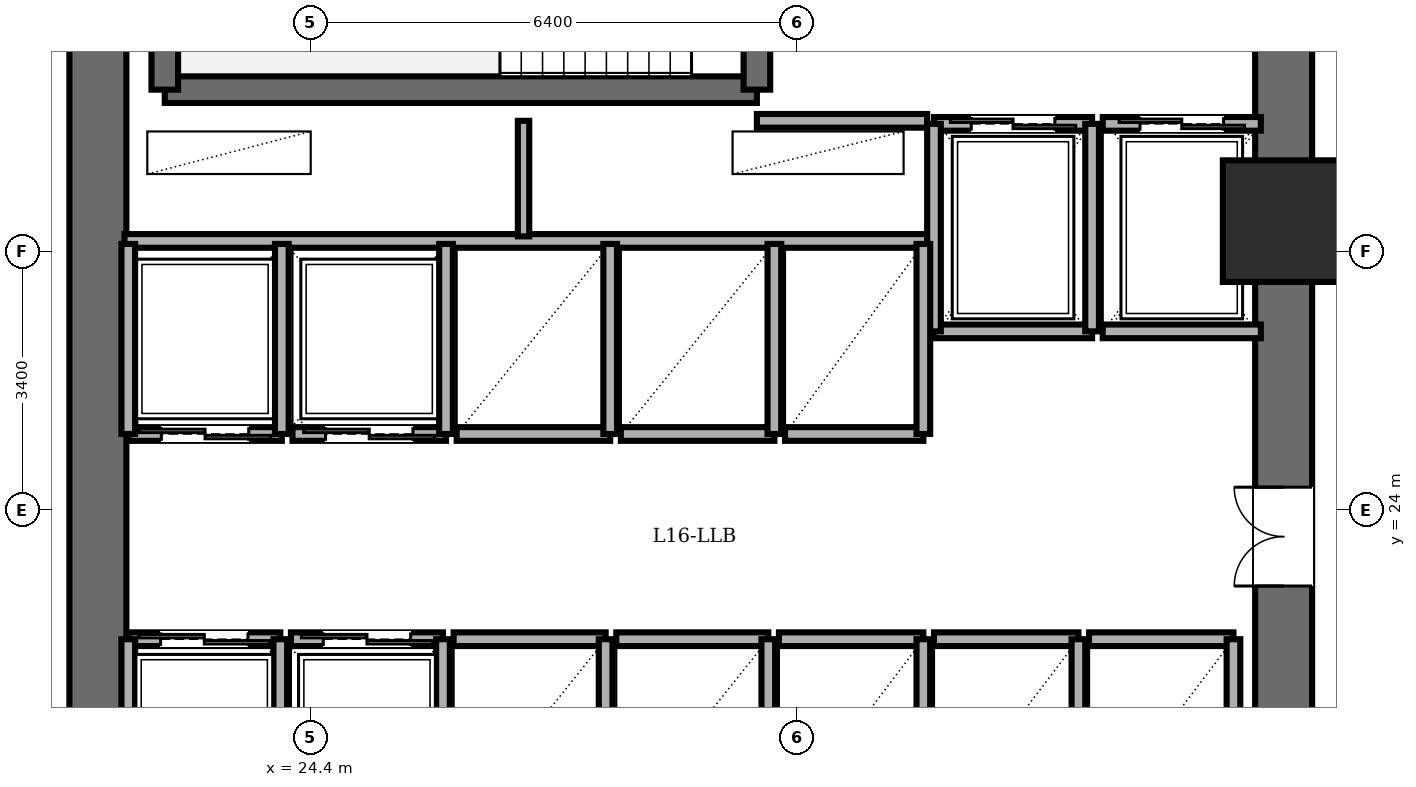
"""IFC4 building model, lengths in metres.
Left out: names, types, materials, properties, quantities, classifications, styles, units other than length and angle.
Written with IfcOpenShell. Run it as: python <this file> out.ifc"""

import sys

from ifc_helpers import new_model, si_unit, direction, frame, frame_2d, origin, origin_2d, place, context, subcontext, project, spatial, rectangle, extrude, element, fill, save


model = new_model("IFC4")
c1 = context("Model", 3, precision=1e-05, world=origin(), true_north=direction((0.0, 1.0)))
c2 = subcontext(c1, "Body", "Model", "MODEL_VIEW")
j1 = project(units=[si_unit("LENGTHUNIT", "METRE"), si_unit("PLANEANGLEUNIT", "RADIAN")], contexts=[c1])
p1 = place(None, origin())
s1 = spatial("IfcSite", under=j1, at=p1, CompositionType="ELEMENT")
p2 = place(p1, origin())
s2 = spatial("IfcBuilding", under=s1, at=p2, CompositionType="ELEMENT")
p3 = place(p2, frame((0.0, 0.0, 61.2)))
s3 = spatial("IfcBuildingStorey", under=s2, at=p3, CompositionType="ELEMENT", Elevation=61.2)
p4 = place(p3, frame((37.2, 27.8, 0.0), z_axis=(0.0, 0.0, 1.0), x_axis=(1.0, 0.0, 0.0)))
e1 = element("IfcColumn", 1, at=p4, inside=s3, PredefinedType="COLUMN", context=c2, shape_type="SweptSolid", body=[
    extrude(rectangle(XDim=1.6, YDim=1.6, at=origin_2d()), origin(), (0.0, 0.0, 1.0), 3.6),
])
p5 = place(p3, frame((21.6, 14.4, 0.0), z_axis=(0.0, 0.0, 1.0), x_axis=(0.0, 1.0, 0.0)))
e2 = element("IfcWall", 2, at=p5, inside=s3, PredefinedType="SHEAR", context=c2, shape_type="SweptSolid", body=[
    extrude(rectangle(XDim=19.2, YDim=0.75, at=frame_2d((9.6, 0.0))), origin(), (0.0, 0.0, 1.0), 3.4),
])
p6 = place(p3, frame((37.2, 14.4, 0.0), z_axis=(0.0, 0.0, 1.0), x_axis=(0.0, 1.0, 0.0)))
e3 = element("IfcWall", 3, at=p6, inside=s3, PredefinedType="SHEAR", context=c2, shape_type="SweptSolid", body=[
    extrude(rectangle(XDim=19.2, YDim=0.75, at=frame_2d((9.6, 0.0))), origin(), (0.0, 0.0, 1.0), 3.4),
])
p7 = place(p6, frame((15.8, 0.0, 0.0)))
e4 = element("IfcOpeningElement", 4, at=p7, cuts=e3, PredefinedType="OPENING", context=c2, shape_type="SweptSolid", body=[
    extrude(rectangle(XDim=1.15, YDim=2.15, at=frame_2d((0.575, 1.075))), frame((0.0, 0.385, 0.0), z_axis=(0.0, -1.0, 0.0), x_axis=(1.0, 0.0, 0.0)), (0.0, 0.0, 1.0), 0.77),
])
p8 = place(p6, frame((3.6, 0.0, 0.0)))
e5 = element("IfcOpeningElement", 5, at=p8, cuts=e3, PredefinedType="OPENING", context=c2, shape_type="SweptSolid", body=[
    extrude(rectangle(XDim=1.1, YDim=2.15, at=frame_2d((0.55, 1.075))), frame((0.0, 0.385, 0.0), z_axis=(0.0, -1.0, 0.0), x_axis=(1.0, 0.0, 0.0)), (0.0, 0.0, 1.0), 0.77),
])
p9 = place(p6, frame((8.6, 0.0, 0.0)))
e6 = element("IfcOpeningElement", 6, at=p9, cuts=e3, PredefinedType="OPENING", context=c2, shape_type="SweptSolid", body=[
    extrude(rectangle(XDim=1.3, YDim=2.2, at=frame_2d((0.65, 1.1))), frame((0.0, 0.385, 0.0), z_axis=(0.0, -1.0, 0.0), x_axis=(1.0, 0.0, 0.0)), (0.0, 0.0, 1.0), 0.77),
])
p10 = place(p3, frame((22.48, 29.53, 0.0), z_axis=(0.0, 0.0, 1.0), x_axis=(1.0, 0.0, 0.0)))
e7 = element("IfcWall", 7, at=p10, inside=s3, PredefinedType="SOLIDWALL", context=c2, shape_type="SweptSolid", body=[
    extrude(rectangle(XDim=7.79, YDim=0.35, at=frame_2d((3.895, 0.0))), origin(), (0.0, 0.0, 1.0), 3.4),
])
p11 = place(p3, frame((22.48, 29.53, 0.0), z_axis=(0.0, 0.0, 1.0), x_axis=(0.0, 1.0, 0.0)))
e8 = element("IfcWall", 8, at=p11, inside=s3, PredefinedType="SOLIDWALL", context=c2, shape_type="SweptSolid", body=[
    extrude(rectangle(XDim=3.58, YDim=0.35, at=frame_2d((1.79, 0.0))), origin(), (0.0, 0.0, 1.0), 3.4),
])
p12 = place(p3, frame((30.27, 29.53, 0.0), z_axis=(0.0, 0.0, 1.0), x_axis=(0.0, 1.0, 0.0)))
e9 = element("IfcWall", 9, at=p12, inside=s3, PredefinedType="SOLIDWALL", context=c2, shape_type="SweptSolid", body=[
    extrude(rectangle(XDim=3.58, YDim=0.35, at=frame_2d((1.79, 0.0))), origin(), (0.0, 0.0, 1.0), 3.4),
])
p13 = place(p12, frame((1.25, 0.0, 0.0)))
e10 = element("IfcOpeningElement", 10, at=p13, cuts=e9, PredefinedType="OPENING", context=c2, shape_type="SweptSolid", body=[
    extrude(rectangle(XDim=1.1, YDim=2.15, at=frame_2d((0.55, 1.075))), frame((0.0, 0.185, 0.0), z_axis=(0.0, -1.0, 0.0), x_axis=(1.0, 0.0, 0.0)), (0.0, 0.0, 1.0), 0.37),
])
p14 = place(p3, frame((30.27, 29.12, 0.0), z_axis=(0.0, 0.0, 1.0), x_axis=(1.0, 0.0, 0.0)))
e11 = element("IfcWall", 11, at=p14, inside=s3, PredefinedType="PARTITIONING", context=c2, shape_type="SweptSolid", body=[
    extrude(rectangle(XDim=2.24, YDim=0.18, at=frame_2d((1.12, 0.0))), origin(), (0.0, 0.0, 1.0), 3.4),
])
p15 = place(p3, frame((21.95, 27.54, 0.0), z_axis=(0.0, 0.0, 1.0), x_axis=(1.0, 0.0, 0.0)))
e12 = element("IfcWall", 12, at=p15, inside=s3, PredefinedType="PARTITIONING", context=c2, shape_type="SweptSolid", body=[
    extrude(rectangle(XDim=10.56, YDim=0.18, at=frame_2d((5.28, 0.0))), origin(), (0.0, 0.0, 1.0), 3.4),
])
p16 = place(p3, frame((27.2, 27.6, 0.0), z_axis=(0.0, 0.0, 1.0), x_axis=(0.0, 1.0, 0.0)))
e13 = element("IfcWall", 13, at=p16, inside=s3, PredefinedType="PARTITIONING", context=c2, shape_type="SweptSolid", body=[
    extrude(rectangle(XDim=1.52, YDim=0.15, at=frame_2d((0.76, 0.0))), origin(), (0.0, 0.0, 1.0), 3.4),
])
p17 = place(p3, frame((32.6, 29.08, 0.0), z_axis=(0.0, 0.0, 1.0), x_axis=(1.0, 0.0, 0.0)))
e14 = element("IfcWall", 14, at=p17, inside=s3, PredefinedType="PARTITIONING", context=c2, shape_type="SweptSolid", body=[
    extrude(rectangle(XDim=2.08, YDim=0.18, at=frame_2d((1.04, 0.0))), origin(), (0.0, 0.0, 1.0), 3.4),
])
p18 = place(p17, frame((0.49, 0.0, 0.0)))
e15 = element("IfcOpeningElement", 15, at=p18, cuts=e14, PredefinedType="OPENING", context=c2, shape_type="SweptSolid", body=[
    extrude(rectangle(XDim=1.1, YDim=2.2, at=frame_2d((0.55, 1.1))), frame((0.0, 0.1, 0.0), z_axis=(0.0, -1.0, 0.0), x_axis=(1.0, 0.0, 0.0)), (0.0, 0.0, 1.0), 0.2),
])
p19 = place(p3, frame((34.68, 26.35, 0.0), z_axis=(0.0, 0.0, 1.0), x_axis=(-1.0, 0.0, 0.0)))
e16 = element("IfcWall", 16, at=p19, inside=s3, PredefinedType="PARTITIONING", context=c2, shape_type="SweptSolid", body=[
    extrude(rectangle(XDim=2.08, YDim=0.18, at=frame_2d((1.04, 0.0))), origin(), (0.0, 0.0, 1.0), 3.4),
])
for number, where, z_axis, x_axis in (
    (17, (34.68, 26.35, 0.0), (0.0, 0.0, 1.0), (0.0, 1.0, 0.0)),
    (18, (32.6, 29.08, 0.0), (0.0, 0.0, 1.0), (0.0, -1.0, 0.0)),
):
    element("IfcWall", number, at=place(p3, frame(where, z_axis=z_axis, x_axis=x_axis)), inside=s3, PredefinedType="PARTITIONING", context=c2, shape_type="SweptSolid", body=[
        extrude(rectangle(XDim=2.73, YDim=0.18, at=frame_2d((1.365, 0.0))), origin(), (0.0, 0.0, 1.0), 3.4),
    ])
p20 = place(p3, frame((34.82, 29.08, 0.0), z_axis=(0.0, 0.0, 1.0), x_axis=(1.0, 0.0, 0.0)))
e19 = element("IfcWall", 19, at=p20, inside=s3, PredefinedType="PARTITIONING", context=c2, shape_type="SweptSolid", body=[
    extrude(rectangle(XDim=2.08, YDim=0.18, at=frame_2d((1.04, 0.0))), origin(), (0.0, 0.0, 1.0), 3.4),
])
p21 = place(p20, frame((0.49, 0.0, 0.0)))
e20 = element("IfcOpeningElement", 20, at=p21, cuts=e19, PredefinedType="OPENING", context=c2, shape_type="SweptSolid", body=[
    extrude(rectangle(XDim=1.1, YDim=2.2, at=frame_2d((0.55, 1.1))), frame((0.0, 0.1, 0.0), z_axis=(0.0, -1.0, 0.0), x_axis=(1.0, 0.0, 0.0)), (0.0, 0.0, 1.0), 0.2),
])
p22 = place(p3, frame((36.9, 26.35, 0.0), z_axis=(0.0, 0.0, 1.0), x_axis=(-1.0, 0.0, 0.0)))
e21 = element("IfcWall", 21, at=p22, inside=s3, PredefinedType="PARTITIONING", context=c2, shape_type="SweptSolid", body=[
    extrude(rectangle(XDim=2.08, YDim=0.18, at=frame_2d((1.04, 0.0))), origin(), (0.0, 0.0, 1.0), 3.4),
])
p23 = place(p3, frame((24.02, 25.0, 0.0), z_axis=(0.0, 0.0, 1.0), x_axis=(-1.0, 0.0, 0.0)))
e22 = element("IfcWall", 22, at=p23, inside=s3, PredefinedType="PARTITIONING", context=c2, shape_type="SweptSolid", body=[
    extrude(rectangle(XDim=2.02, YDim=0.18, at=frame_2d((1.01, 0.0))), origin(), (0.0, 0.0, 1.0), 3.4),
])
p24 = place(p23, frame((0.435, 0.0, 0.0)))
e23 = element("IfcOpeningElement", 23, at=p24, cuts=e22, PredefinedType="OPENING", context=c2, shape_type="SweptSolid", body=[
    extrude(rectangle(XDim=1.15, YDim=2.2, at=frame_2d((0.575, 1.1))), frame((0.0, 0.1, 0.0), z_axis=(0.0, -1.0, 0.0), x_axis=(1.0, 0.0, 0.0)), (0.0, 0.0, 1.0), 0.2),
])
for number, where, z_axis, x_axis in (
    (24, (24.02, 25.0, 0.0), (0.0, 0.0, 1.0), (0.0, 1.0, 0.0)),
    (25, (22.0, 27.5, 0.0), (0.0, 0.0, 1.0), (0.0, -1.0, 0.0)),
):
    element("IfcWall", number, at=place(p3, frame(where, z_axis=z_axis, x_axis=x_axis)), inside=s3, PredefinedType="PARTITIONING", context=c2, shape_type="SweptSolid", body=[
        extrude(rectangle(XDim=2.5, YDim=0.18, at=frame_2d((1.25, 0.0))), origin(), (0.0, 0.0, 1.0), 3.4),
    ])
p25 = place(p3, frame((26.18, 25.0, 0.0), z_axis=(0.0, 0.0, 1.0), x_axis=(-1.0, 0.0, 0.0)))
e26 = element("IfcWall", 26, at=p25, inside=s3, PredefinedType="PARTITIONING", context=c2, shape_type="SweptSolid", body=[
    extrude(rectangle(XDim=2.02, YDim=0.18, at=frame_2d((1.01, 0.0))), origin(), (0.0, 0.0, 1.0), 3.4),
])
p26 = place(p25, frame((0.435, 0.0, 0.0)))
e27 = element("IfcOpeningElement", 27, at=p26, cuts=e26, PredefinedType="OPENING", context=c2, shape_type="SweptSolid", body=[
    extrude(rectangle(XDim=1.15, YDim=2.2, at=frame_2d((0.575, 1.1))), frame((0.0, 0.1, 0.0), z_axis=(0.0, -1.0, 0.0), x_axis=(1.0, 0.0, 0.0)), (0.0, 0.0, 1.0), 0.2),
])
p27 = place(p3, frame((26.18, 25.0, 0.0), z_axis=(0.0, 0.0, 1.0), x_axis=(0.0, 1.0, 0.0)))
e28 = element("IfcWall", 28, at=p27, inside=s3, PredefinedType="PARTITIONING", context=c2, shape_type="SweptSolid", body=[
    extrude(rectangle(XDim=2.5, YDim=0.18, at=frame_2d((1.25, 0.0))), origin(), (0.0, 0.0, 1.0), 3.4),
])
p28 = place(p3, frame((22.0, 22.3, 0.0), z_axis=(0.0, 0.0, 1.0), x_axis=(1.0, 0.0, 0.0)))
e29 = element("IfcWall", 29, at=p28, inside=s3, PredefinedType="PARTITIONING", context=c2, shape_type="SweptSolid", body=[
    extrude(rectangle(XDim=2.0, YDim=0.18, at=frame_2d((1.0, 0.0))), origin(), (0.0, 0.0, 1.0), 3.4),
])
p29 = place(p28, frame((0.425, 0.0, 0.0)))
e30 = element("IfcOpeningElement", 30, at=p29, cuts=e29, PredefinedType="OPENING", context=c2, shape_type="SweptSolid", body=[
    extrude(rectangle(XDim=1.15, YDim=2.2, at=frame_2d((0.575, 1.1))), frame((0.0, 0.1, 0.0), z_axis=(0.0, -1.0, 0.0), x_axis=(1.0, 0.0, 0.0)), (0.0, 0.0, 1.0), 0.2),
])
for number, where, z_axis, x_axis in (
    (31, (24.0, 19.8, 0.0), (0.0, 0.0, 1.0), (0.0, 1.0, 0.0)),
    (32, (22.0, 22.3, 0.0), (0.0, 0.0, 1.0), (0.0, -1.0, 0.0)),
):
    element("IfcWall", number, at=place(p3, frame(where, z_axis=z_axis, x_axis=x_axis)), inside=s3, PredefinedType="PARTITIONING", context=c2, shape_type="SweptSolid", body=[
        extrude(rectangle(XDim=2.5, YDim=0.18, at=frame_2d((1.25, 0.0))), origin(), (0.0, 0.0, 1.0), 3.4),
    ])
p30 = place(p3, frame((24.14, 22.3, 0.0), z_axis=(0.0, 0.0, 1.0), x_axis=(1.0, 0.0, 0.0)))
e33 = element("IfcWall", 33, at=p30, inside=s3, PredefinedType="PARTITIONING", context=c2, shape_type="SweptSolid", body=[
    extrude(rectangle(XDim=2.0, YDim=0.18, at=frame_2d((1.0, 0.0))), origin(), (0.0, 0.0, 1.0), 3.4),
])
p31 = place(p30, frame((0.425, 0.0, 0.0)))
e34 = element("IfcOpeningElement", 34, at=p31, cuts=e33, PredefinedType="OPENING", context=c2, shape_type="SweptSolid", body=[
    extrude(rectangle(XDim=1.15, YDim=2.2, at=frame_2d((0.575, 1.1))), frame((0.0, 0.1, 0.0), z_axis=(0.0, -1.0, 0.0), x_axis=(1.0, 0.0, 0.0)), (0.0, 0.0, 1.0), 0.2),
])
p32 = place(p3, frame((26.14, 19.8, 0.0), z_axis=(0.0, 0.0, 1.0), x_axis=(0.0, 1.0, 0.0)))
e35 = element("IfcWall", 35, at=p32, inside=s3, PredefinedType="PARTITIONING", context=c2, shape_type="SweptSolid", body=[
    extrude(rectangle(XDim=2.5, YDim=0.18, at=frame_2d((1.25, 0.0))), origin(), (0.0, 0.0, 1.0), 3.4),
])
p33 = place(p3, frame((28.34, 25.0, 0.0), z_axis=(0.0, 0.0, 1.0), x_axis=(-1.0, 0.0, 0.0)))
e36 = element("IfcWall", 36, at=p33, inside=s3, PredefinedType="PARTITIONING", context=c2, shape_type="SweptSolid", body=[
    extrude(rectangle(XDim=2.02, YDim=0.18, at=frame_2d((1.01, 0.0))), origin(), (0.0, 0.0, 1.0), 3.4),
])
p34 = place(p3, frame((28.34, 25.0, 0.0), z_axis=(0.0, 0.0, 1.0), x_axis=(0.0, 1.0, 0.0)))
e37 = element("IfcWall", 37, at=p34, inside=s3, PredefinedType="PARTITIONING", context=c2, shape_type="SweptSolid", body=[
    extrude(rectangle(XDim=2.5, YDim=0.18, at=frame_2d((1.25, 0.0))), origin(), (0.0, 0.0, 1.0), 3.4),
])
p35 = place(p3, frame((30.5, 25.0, 0.0), z_axis=(0.0, 0.0, 1.0), x_axis=(-1.0, 0.0, 0.0)))
e38 = element("IfcWall", 38, at=p35, inside=s3, PredefinedType="PARTITIONING", context=c2, shape_type="SweptSolid", body=[
    extrude(rectangle(XDim=2.02, YDim=0.18, at=frame_2d((1.01, 0.0))), origin(), (0.0, 0.0, 1.0), 3.4),
])
p36 = place(p3, frame((30.5, 25.0, 0.0), z_axis=(0.0, 0.0, 1.0), x_axis=(0.0, 1.0, 0.0)))
e39 = element("IfcWall", 39, at=p36, inside=s3, PredefinedType="PARTITIONING", context=c2, shape_type="SweptSolid", body=[
    extrude(rectangle(XDim=2.5, YDim=0.18, at=frame_2d((1.25, 0.0))), origin(), (0.0, 0.0, 1.0), 3.4),
])
p37 = place(p3, frame((26.28, 22.3, 0.0), z_axis=(0.0, 0.0, 1.0), x_axis=(1.0, 0.0, 0.0)))
e40 = element("IfcWall", 40, at=p37, inside=s3, PredefinedType="PARTITIONING", context=c2, shape_type="SweptSolid", body=[
    extrude(rectangle(XDim=2.0, YDim=0.18, at=frame_2d((1.0, 0.0))), origin(), (0.0, 0.0, 1.0), 3.4),
])
p38 = place(p3, frame((28.28, 19.8, 0.0), z_axis=(0.0, 0.0, 1.0), x_axis=(0.0, 1.0, 0.0)))
e41 = element("IfcWall", 41, at=p38, inside=s3, PredefinedType="PARTITIONING", context=c2, shape_type="SweptSolid", body=[
    extrude(rectangle(XDim=2.5, YDim=0.18, at=frame_2d((1.25, 0.0))), origin(), (0.0, 0.0, 1.0), 3.4),
])
p39 = place(p3, frame((28.42, 22.3, 0.0), z_axis=(0.0, 0.0, 1.0), x_axis=(1.0, 0.0, 0.0)))
e42 = element("IfcWall", 42, at=p39, inside=s3, PredefinedType="PARTITIONING", context=c2, shape_type="SweptSolid", body=[
    extrude(rectangle(XDim=2.0, YDim=0.18, at=frame_2d((1.0, 0.0))), origin(), (0.0, 0.0, 1.0), 3.4),
])
p40 = place(p3, frame((30.42, 19.8, 0.0), z_axis=(0.0, 0.0, 1.0), x_axis=(0.0, 1.0, 0.0)))
e43 = element("IfcWall", 43, at=p40, inside=s3, PredefinedType="PARTITIONING", context=c2, shape_type="SweptSolid", body=[
    extrude(rectangle(XDim=2.5, YDim=0.18, at=frame_2d((1.25, 0.0))), origin(), (0.0, 0.0, 1.0), 3.4),
])
p41 = place(p3, frame((32.46, 25.0, 0.0), z_axis=(0.0, 0.0, 1.0), x_axis=(-1.0, 0.0, 0.0)))
e44 = element("IfcWall", 44, at=p41, inside=s3, PredefinedType="PARTITIONING", context=c2, shape_type="SweptSolid", body=[
    extrude(rectangle(XDim=1.82, YDim=0.18, at=frame_2d((0.91, 0.0))), origin(), (0.0, 0.0, 1.0), 3.4),
])
p42 = place(p3, frame((32.46, 25.0, 0.0), z_axis=(0.0, 0.0, 1.0), x_axis=(0.0, 1.0, 0.0)))
e45 = element("IfcWall", 45, at=p42, inside=s3, PredefinedType="PARTITIONING", context=c2, shape_type="SweptSolid", body=[
    extrude(rectangle(XDim=2.5, YDim=0.18, at=frame_2d((1.25, 0.0))), origin(), (0.0, 0.0, 1.0), 3.4),
])
p43 = place(p3, frame((30.56, 22.3, 0.0), z_axis=(0.0, 0.0, 1.0), x_axis=(1.0, 0.0, 0.0)))
e46 = element("IfcWall", 46, at=p43, inside=s3, PredefinedType="PARTITIONING", context=c2, shape_type="SweptSolid", body=[
    extrude(rectangle(XDim=1.9, YDim=0.18, at=frame_2d((0.95, 0.0))), origin(), (0.0, 0.0, 1.0), 3.4),
])
p44 = place(p3, frame((32.46, 19.8, 0.0), z_axis=(0.0, 0.0, 1.0), x_axis=(0.0, 1.0, 0.0)))
e47 = element("IfcWall", 47, at=p44, inside=s3, PredefinedType="PARTITIONING", context=c2, shape_type="SweptSolid", body=[
    extrude(rectangle(XDim=2.5, YDim=0.18, at=frame_2d((1.25, 0.0))), origin(), (0.0, 0.0, 1.0), 3.4),
])
p45 = place(p3, frame((32.6, 22.3, 0.0), z_axis=(0.0, 0.0, 1.0), x_axis=(1.0, 0.0, 0.0)))
e48 = element("IfcWall", 48, at=p45, inside=s3, PredefinedType="PARTITIONING", context=c2, shape_type="SweptSolid", body=[
    extrude(rectangle(XDim=1.9, YDim=0.18, at=frame_2d((0.95, 0.0))), origin(), (0.0, 0.0, 1.0), 3.4),
])
p46 = place(p3, frame((34.5, 19.8, 0.0), z_axis=(0.0, 0.0, 1.0), x_axis=(0.0, 1.0, 0.0)))
e49 = element("IfcWall", 49, at=p46, inside=s3, PredefinedType="PARTITIONING", context=c2, shape_type="SweptSolid", body=[
    extrude(rectangle(XDim=2.5, YDim=0.18, at=frame_2d((1.25, 0.0))), origin(), (0.0, 0.0, 1.0), 3.4),
])
p47 = place(p3, frame((34.64, 22.3, 0.0), z_axis=(0.0, 0.0, 1.0), x_axis=(1.0, 0.0, 0.0)))
e50 = element("IfcWall", 50, at=p47, inside=s3, PredefinedType="PARTITIONING", context=c2, shape_type="SweptSolid", body=[
    extrude(rectangle(XDim=1.9, YDim=0.18, at=frame_2d((0.95, 0.0))), origin(), (0.0, 0.0, 1.0), 3.4),
])
p48 = place(p3, frame((36.54, 19.8, 0.0), z_axis=(0.0, 0.0, 1.0), x_axis=(0.0, 1.0, 0.0)))
e51 = element("IfcWall", 51, at=p48, inside=s3, PredefinedType="PARTITIONING", context=c2, shape_type="SweptSolid", body=[
    extrude(rectangle(XDim=2.5, YDim=0.18, at=frame_2d((1.25, 0.0))), origin(), (0.0, 0.0, 1.0), 3.4),
])
p49 = place(p18, origin())
e52 = element("IfcDoor", 52, at=p49, inside=s3, OperationType="DOUBLE_DOOR_SLIDING", PredefinedType="DOOR", context=c2, shape_type="SweptSolid", body=[
    extrude(rectangle(XDim=1.1, YDim=2.2, at=frame_2d((0.55, 1.1))), frame((0.0, 0.025, 0.0), z_axis=(0.0, -1.0, 0.0), x_axis=(1.0, 0.0, 0.0)), (0.0, 0.0, 1.0), 0.05),
])
fill(e15, e52)
p50 = place(p21, origin())
e53 = element("IfcDoor", 53, at=p50, inside=s3, OperationType="DOUBLE_DOOR_SLIDING", PredefinedType="DOOR", context=c2, shape_type="SweptSolid", body=[
    extrude(rectangle(XDim=1.1, YDim=2.2, at=frame_2d((0.55, 1.1))), frame((0.0, 0.025, 0.0), z_axis=(0.0, -1.0, 0.0), x_axis=(1.0, 0.0, 0.0)), (0.0, 0.0, 1.0), 0.05),
])
fill(e20, e53)
p51 = place(p24, origin())
e54 = element("IfcDoor", 54, at=p51, inside=s3, OperationType="DOUBLE_DOOR_SLIDING", PredefinedType="DOOR", context=c2, shape_type="SweptSolid", body=[
    extrude(rectangle(XDim=1.15, YDim=2.2, at=frame_2d((0.575, 1.1))), frame((0.0, 0.025, 0.0), z_axis=(0.0, -1.0, 0.0), x_axis=(1.0, 0.0, 0.0)), (0.0, 0.0, 1.0), 0.05),
])
fill(e23, e54)
p52 = place(p26, origin())
e55 = element("IfcDoor", 55, at=p52, inside=s3, OperationType="DOUBLE_DOOR_SLIDING", PredefinedType="DOOR", context=c2, shape_type="SweptSolid", body=[
    extrude(rectangle(XDim=1.15, YDim=2.2, at=frame_2d((0.575, 1.1))), frame((0.0, 0.025, 0.0), z_axis=(0.0, -1.0, 0.0), x_axis=(1.0, 0.0, 0.0)), (0.0, 0.0, 1.0), 0.05),
])
fill(e27, e55)
p53 = place(p29, origin())
e56 = element("IfcDoor", 56, at=p53, inside=s3, OperationType="DOUBLE_DOOR_SLIDING", PredefinedType="DOOR", context=c2, shape_type="SweptSolid", body=[
    extrude(rectangle(XDim=1.15, YDim=2.2, at=frame_2d((0.575, 1.1))), frame((0.0, 0.025, 0.0), z_axis=(0.0, -1.0, 0.0), x_axis=(1.0, 0.0, 0.0)), (0.0, 0.0, 1.0), 0.05),
])
fill(e30, e56)
p54 = place(p31, origin())
e57 = element("IfcDoor", 57, at=p54, inside=s3, OperationType="DOUBLE_DOOR_SLIDING", PredefinedType="DOOR", context=c2, shape_type="SweptSolid", body=[
    extrude(rectangle(XDim=1.15, YDim=2.2, at=frame_2d((0.575, 1.1))), frame((0.0, 0.025, 0.0), z_axis=(0.0, -1.0, 0.0), x_axis=(1.0, 0.0, 0.0)), (0.0, 0.0, 1.0), 0.05),
])
fill(e34, e57)
p55 = place(p9, origin())
e58 = element("IfcDoor", 58, at=p55, inside=s3, OperationType="DOUBLE_DOOR_SINGLE_SWING", PredefinedType="DOOR", context=c2, shape_type="SweptSolid", body=[
    extrude(rectangle(XDim=1.3, YDim=2.2, at=frame_2d((0.65, 1.1))), frame((0.0, 0.025, 0.0), z_axis=(0.0, -1.0, 0.0), x_axis=(1.0, 0.0, 0.0)), (0.0, 0.0, 1.0), 0.05),
])
fill(e6, e58)
save(model, sys.argv[1])
